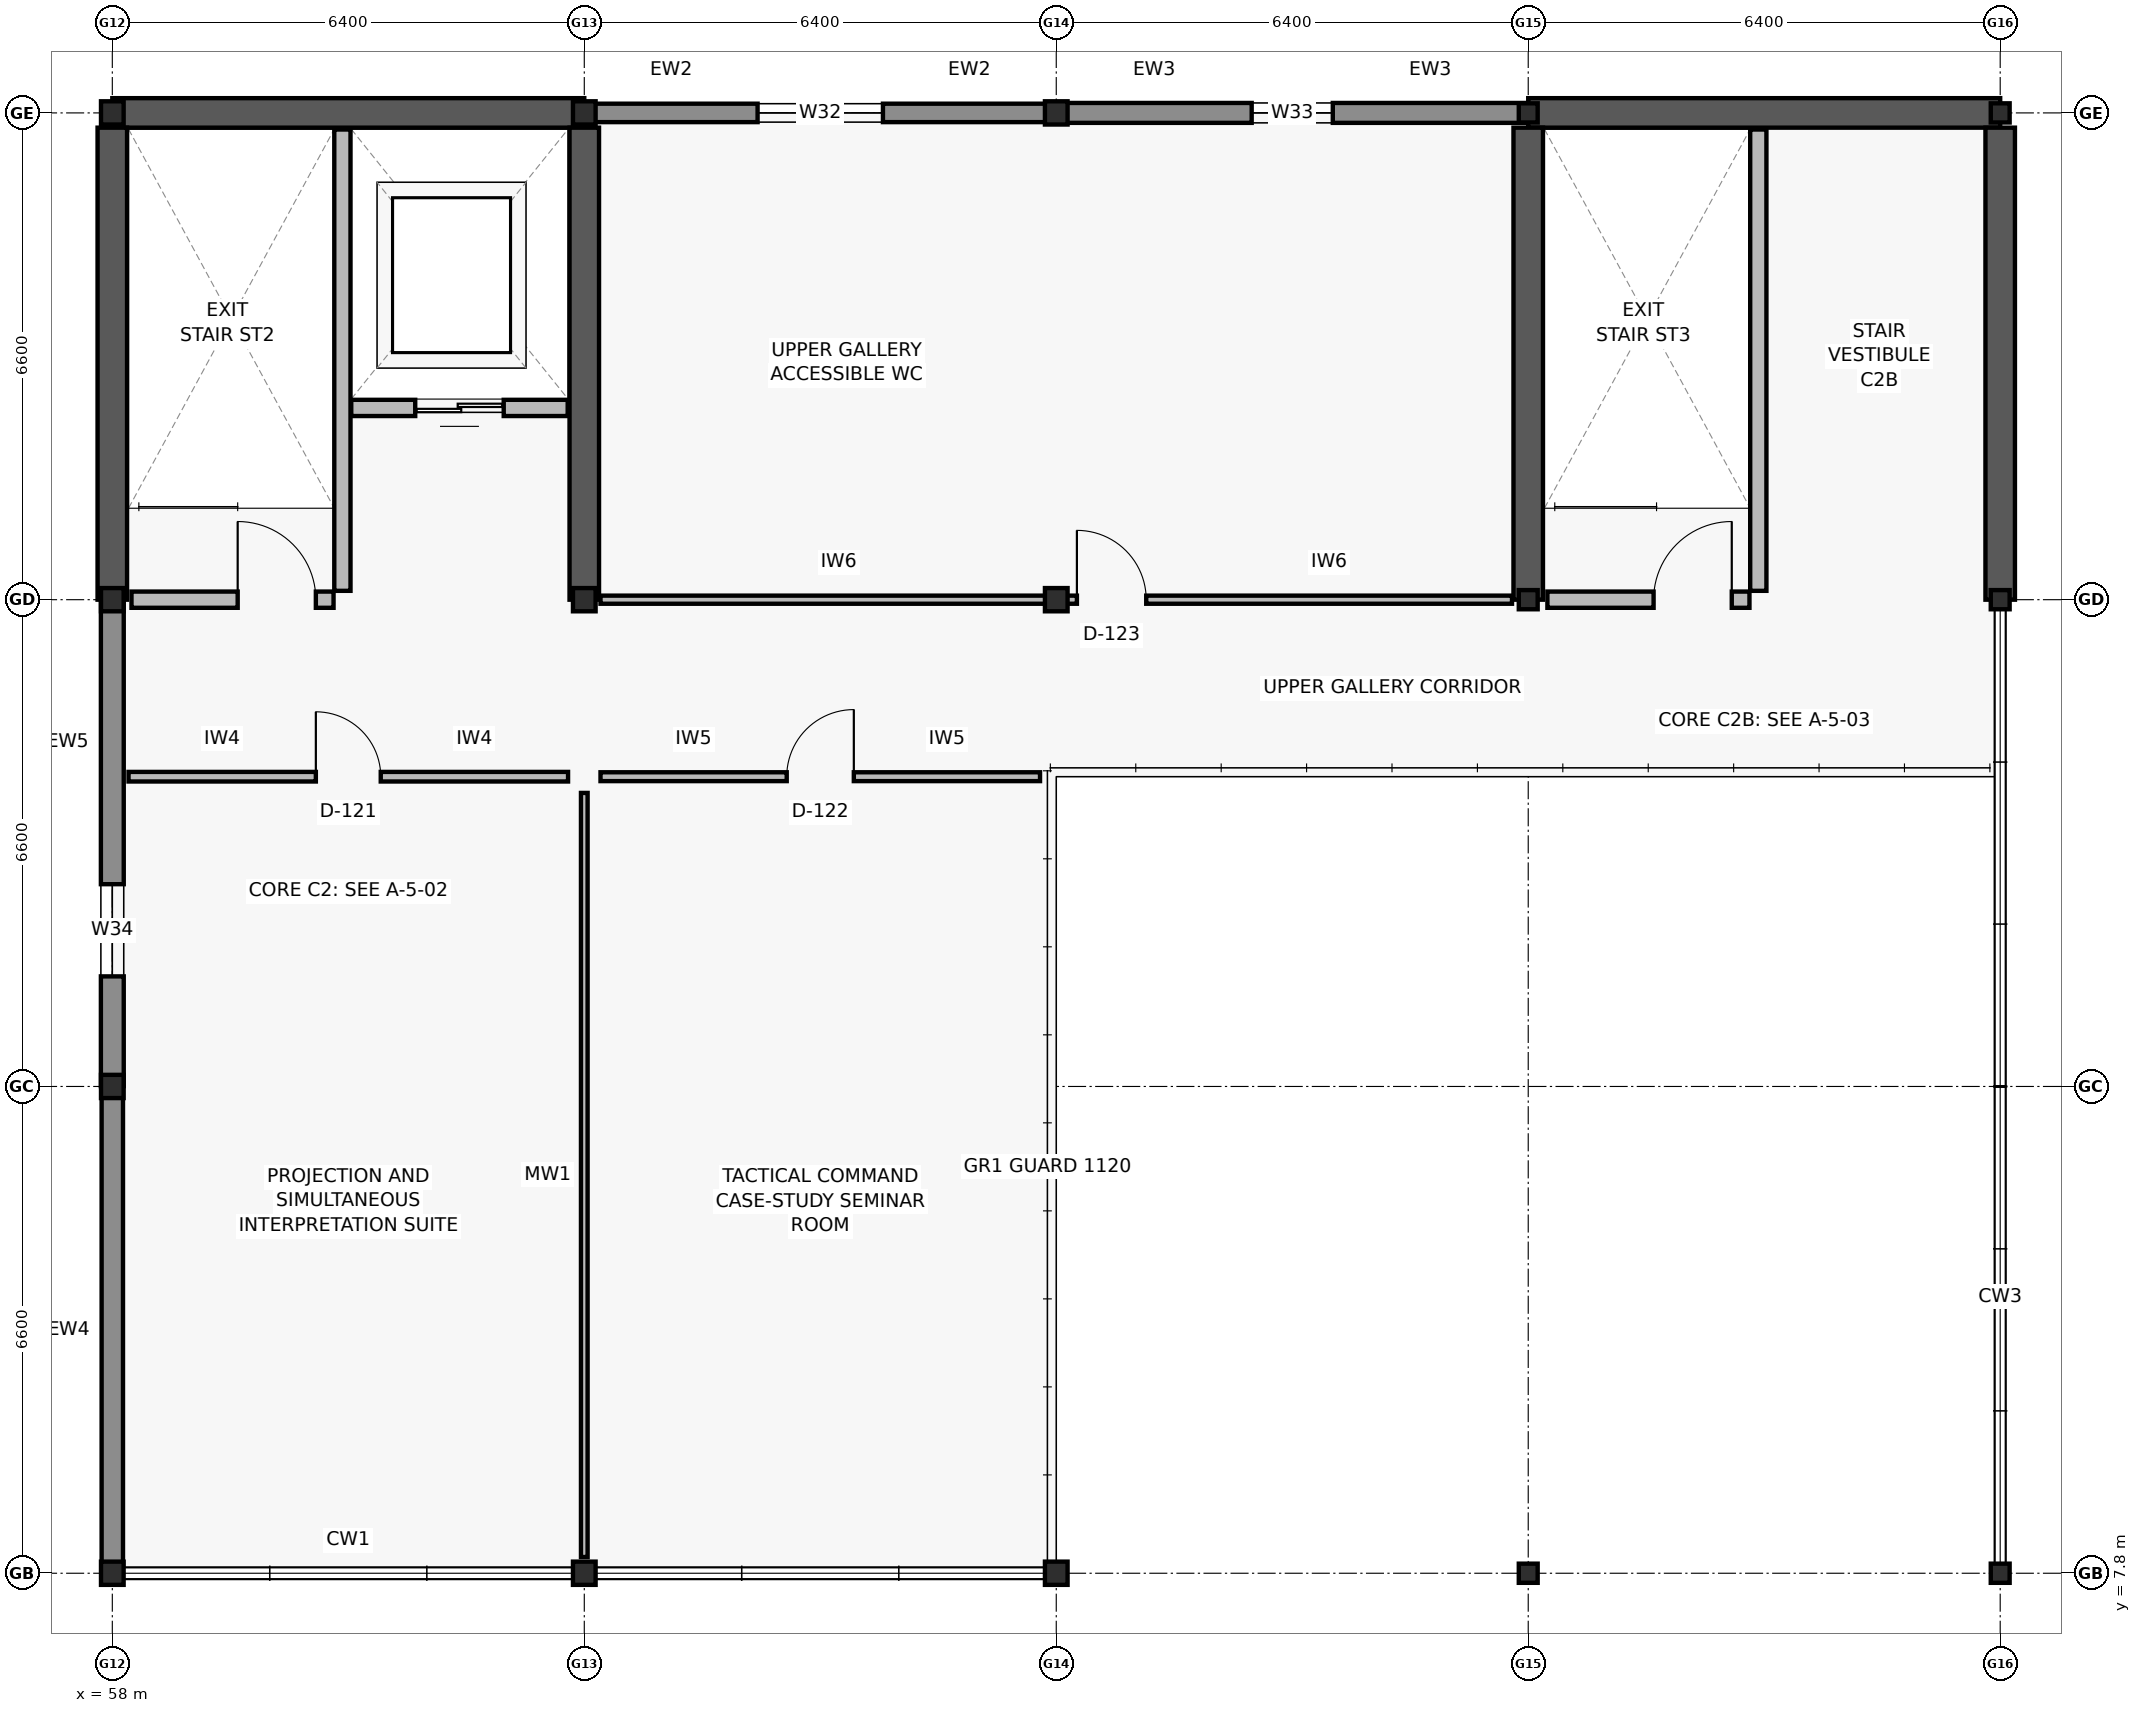
"""IFC4 building model, lengths in metres.
Left out: names, types, materials, properties, quantities, classifications, styles, units other than length and angle.
Written with IfcOpenShell. Run it as: python <this file> out.ifc"""

import sys

from ifc_helpers import new_model, si_unit, direction, frame, frame_2d, origin, origin_2d, place, context, subcontext, project, spatial, rectangle, i_section, extrude, element, fill, save


model = new_model("IFC4")
c1 = context("Model", 3, precision=1e-05, world=origin(), true_north=direction((0.0, 1.0)))
c2 = subcontext(c1, "Body", "Model", "MODEL_VIEW")
j1 = project(units=[si_unit("LENGTHUNIT", "METRE"), si_unit("PLANEANGLEUNIT", "RADIAN")], contexts=[c1])
p1 = place(None, origin())
s1 = spatial("IfcSite", under=j1, at=p1, CompositionType="ELEMENT")
p2 = place(p1, origin())
s2 = spatial("IfcBuilding", under=s1, at=p2, CompositionType="ELEMENT")
p3 = place(p2, frame((0.0, 0.0, 13.5)))
s3 = spatial("IfcBuildingStorey", under=s2, at=p3, CompositionType="ELEMENT", Elevation=13.5)
for number, where, z_axis, x_axis in (
    (1, (58.0, 7.8, 0.0), (0.0, 0.0, 1.0), (1.0, 0.0, 0.0)),
    (2, (58.0, 14.4, 0.0), (0.0, 0.0, 1.0), (1.0, 0.0, 0.0)),
    (3, (58.0, 21.0, 0.0), (0.0, 0.0, 1.0), (1.0, 0.0, 0.0)),
    (4, (58.0, 27.6, 0.0), (0.0, 0.0, 1.0), (1.0, 0.0, 0.0)),
    (5, (64.4, 7.8, 0.0), (0.0, 0.0, 1.0), (1.0, 0.0, 0.0)),
    (6, (64.4, 21.0, 0.0), (0.0, 0.0, 1.0), (1.0, 0.0, 0.0)),
    (7, (64.4, 27.6, 0.0), (0.0, 0.0, 1.0), (1.0, 0.0, 0.0)),
    (8, (70.8, 7.8, 0.0), (0.0, 0.0, 1.0), (1.0, 0.0, 0.0)),
    (9, (70.8, 21.0, 0.0), (0.0, 0.0, 1.0), (1.0, 0.0, 0.0)),
    (10, (70.8, 27.6, 0.0), (0.0, 0.0, 1.0), (1.0, 0.0, 0.0)),
):
    element("IfcColumn", number, at=place(p3, frame(where, z_axis=z_axis, x_axis=x_axis)), inside=s3, PredefinedType="COLUMN", context=c2, shape_type="SweptSolid", body=[
        extrude(i_section(OverallWidth=0.307, OverallDepth=0.315, WebThickness=0.012, FlangeThickness=0.019, FilletRadius=0.017, at=origin_2d()), origin(), (0.0, 0.0, 1.0), 3.9),
    ])
for number, where, z_axis, x_axis in (
    (11, (77.2, 7.8, 0.0), (0.0, 0.0, 1.0), (1.0, 0.0, 0.0)),
    (12, (77.2, 21.0, 0.0), (0.0, 0.0, 1.0), (1.0, 0.0, 0.0)),
    (13, (77.2, 27.6, 0.0), (0.0, 0.0, 1.0), (1.0, 0.0, 0.0)),
    (14, (83.6, 7.8, 0.0), (0.0, 0.0, 1.0), (1.0, 0.0, 0.0)),
    (15, (83.6, 21.0, 0.0), (0.0, 0.0, 1.0), (1.0, 0.0, 0.0)),
    (16, (83.6, 27.6, 0.0), (0.0, 0.0, 1.0), (1.0, 0.0, 0.0)),
):
    element("IfcColumn", number, at=place(p3, frame(where, z_axis=z_axis, x_axis=x_axis)), inside=s3, PredefinedType="COLUMN", context=c2, shape_type="SweptSolid", body=[
        extrude(i_section(OverallWidth=0.256, OverallDepth=0.26, WebThickness=0.01, FlangeThickness=0.017, FilletRadius=0.013, at=origin_2d()), origin(), (0.0, 0.0, 1.0), 3.9),
    ])
for number, where, z_axis, x_axis in (
    (17, (58.0, 27.6, 0.0), (0.0, 0.0, 1.0), (1.0, 0.0, 0.0)),
    (18, (58.0, 21.0, 0.0), (0.0, 0.0, 1.0), (0.0, 1.0, 0.0)),
    (19, (64.4, 21.0, 0.0), (0.0, 0.0, 1.0), (0.0, 1.0, 0.0)),
):
    element("IfcWall", number, at=place(p3, frame(where, z_axis=z_axis, x_axis=x_axis)), inside=s3, PredefinedType="SHEAR", context=c2, shape_type="SweptSolid", body=[
        extrude(rectangle(XDim=6.4, YDim=0.4, at=frame_2d((3.2, 0.0))), origin(), (0.0, 0.0, 1.0), 3.66),
    ])
p4 = place(p3, frame((77.2, 27.6, 0.0), z_axis=(0.0, 0.0, 1.0), x_axis=(1.0, 0.0, 0.0)))
e20 = element("IfcWall", 20, at=p4, inside=s3, PredefinedType="SHEAR", context=c2, shape_type="SweptSolid", body=[
    extrude(rectangle(XDim=6.4, YDim=0.4, at=frame_2d((3.2, 0.0))), origin(), (0.0, 0.0, 1.0), 3.66),
])
for number, where, z_axis, x_axis in (
    (21, (77.2, 21.0, 0.0), (0.0, 0.0, 1.0), (0.0, 1.0, 0.0)),
    (22, (83.6, 21.0, 0.0), (0.0, 0.0, 1.0), (0.0, 1.0, 0.0)),
):
    element("IfcWall", number, at=place(p3, frame(where, z_axis=z_axis, x_axis=x_axis)), inside=s3, PredefinedType="SHEAR", context=c2, shape_type="SweptSolid", body=[
        extrude(rectangle(XDim=6.4, YDim=0.4, at=frame_2d((3.2, 0.0))), origin(), (0.0, 0.0, 1.0), 3.66),
    ])
p5 = place(p3, frame((64.405, 27.6, 0.0), z_axis=(0.0, 0.0, 1.0), x_axis=(1.0, 0.0, 0.0)))
e23 = element("IfcWall", 23, at=p5, inside=s3, PredefinedType="SOLIDWALL", context=c2, shape_type="SweptSolid", body=[
    extrude(rectangle(XDim=6.39, YDim=0.25, at=frame_2d((3.195, 0.0))), origin(), (0.0, 0.0, 1.0), 3.02),
])
p6 = place(p5, frame((2.345, 0.0, 0.8)))
e24 = element("IfcOpeningElement", 24, at=p6, cuts=e23, PredefinedType="OPENING", context=c2, shape_type="SweptSolid", body=[
    extrude(rectangle(XDim=1.7, YDim=1.25, at=frame_2d((0.85, 0.625))), frame((0.0, 0.135, 0.0), z_axis=(0.0, -1.0, 0.0), x_axis=(1.0, 0.0, 0.0)), (0.0, 0.0, 1.0), 0.27),
])
p7 = place(p3, frame((70.805, 27.6, 0.0), z_axis=(0.0, 0.0, 1.0), x_axis=(1.0, 0.0, 0.0)))
e25 = element("IfcWall", 25, at=p7, inside=s3, PredefinedType="SOLIDWALL", context=c2, shape_type="SweptSolid", body=[
    extrude(rectangle(XDim=6.39, YDim=0.27, at=frame_2d((3.195, 0.0))), origin(), (0.0, 0.0, 1.0), 3.02),
])
p8 = place(p7, frame((2.645, 0.0, 0.8)))
e26 = element("IfcOpeningElement", 26, at=p8, cuts=e25, PredefinedType="OPENING", context=c2, shape_type="SweptSolid", body=[
    extrude(rectangle(XDim=1.1, YDim=1.5, at=frame_2d((0.55, 0.75))), frame((0.0, 0.145, 0.0), z_axis=(0.0, -1.0, 0.0), x_axis=(1.0, 0.0, 0.0)), (0.0, 0.0, 1.0), 0.29),
])
p9 = place(p3, frame((58.0, 7.805, 0.0), z_axis=(0.0, 0.0, 1.0), x_axis=(0.0, 1.0, 0.0)))
e27 = element("IfcWall", 27, at=p9, inside=s3, PredefinedType="SOLIDWALL", context=c2, shape_type="SweptSolid", body=[
    extrude(rectangle(XDim=6.59, YDim=0.29, at=frame_2d((3.295, 0.0))), origin(), (0.0, 0.0, 1.0), 3.02),
])
p10 = place(p3, frame((58.0, 14.405, 0.0), z_axis=(0.0, 0.0, 1.0), x_axis=(0.0, 1.0, 0.0)))
e28 = element("IfcWall", 28, at=p10, inside=s3, PredefinedType="SOLIDWALL", context=c2, shape_type="SweptSolid", body=[
    extrude(rectangle(XDim=6.59, YDim=0.31, at=frame_2d((3.295, 0.0))), origin(), (0.0, 0.0, 1.0), 3.02),
])
p11 = place(p10, frame((1.488, 0.0, 0.8)))
e29 = element("IfcOpeningElement", 29, at=p11, cuts=e28, PredefinedType="OPENING", context=c2, shape_type="SweptSolid", body=[
    extrude(rectangle(XDim=1.25, YDim=1.5, at=frame_2d((0.625, 0.75))), frame((0.0, 0.165, 0.0), z_axis=(0.0, -1.0, 0.0), x_axis=(1.0, 0.0, 0.0)), (0.0, 0.0, 1.0), 0.33),
])
p12 = place(p3, frame((61.12, 21.12, 0.0), z_axis=(0.0, 0.0, 1.0), x_axis=(0.0, 1.0, 0.0)))
e30 = element("IfcWall", 30, at=p12, inside=s3, PredefinedType="SOLIDWALL", context=c2, shape_type="SweptSolid", body=[
    extrude(rectangle(XDim=6.255, YDim=0.22, at=frame_2d((3.127, 0.0))), origin(), (0.0, 0.0, 1.0), 3.02),
])
p13 = place(p3, frame((58.26, 21.0, 0.0), z_axis=(0.0, 0.0, 1.0), x_axis=(1.0, 0.0, 0.0)))
e31 = element("IfcWall", 31, at=p13, inside=s3, PredefinedType="SOLIDWALL", context=c2, shape_type="SweptSolid", body=[
    extrude(rectangle(XDim=2.74, YDim=0.22, at=frame_2d((1.37, 0.0))), origin(), (0.0, 0.0, 1.0), 3.02),
])
p14 = place(p13, frame((1.44, 0.0, 0.0)))
e32 = element("IfcOpeningElement", 32, at=p14, cuts=e31, PredefinedType="OPENING", context=c2, shape_type="SweptSolid", body=[
    extrude(rectangle(XDim=1.06, YDim=2.1, at=frame_2d((0.53, 1.05))), frame((0.0, 0.12, 0.0), z_axis=(0.0, -1.0, 0.0), x_axis=(1.0, 0.0, 0.0)), (0.0, 0.0, 1.0), 0.24),
])
p15 = place(p3, frame((61.24, 23.6, 0.0), z_axis=(0.0, 0.0, 1.0), x_axis=(1.0, 0.0, 0.0)))
e33 = element("IfcWall", 33, at=p15, inside=s3, PredefinedType="SOLIDWALL", context=c2, shape_type="SweptSolid", body=[
    extrude(rectangle(XDim=2.935, YDim=0.22, at=frame_2d((1.468, 0.0))), origin(), (0.0, 0.0, 1.0), 3.02),
])
p16 = place(p15, frame((0.867, 0.0, 0.0)))
e34 = element("IfcOpeningElement", 34, at=p16, cuts=e33, PredefinedType="OPENING", context=c2, shape_type="SweptSolid", body=[
    extrude(rectangle(XDim=1.2, YDim=2.15, at=frame_2d((0.6, 1.075))), frame((0.0, 0.12, 0.0), z_axis=(0.0, -1.0, 0.0), x_axis=(1.0, 0.0, 0.0)), (0.0, 0.0, 1.0), 0.24),
])
p17 = place(p3, frame((80.32, 21.12, 0.0), z_axis=(0.0, 0.0, 1.0), x_axis=(0.0, 1.0, 0.0)))
e35 = element("IfcWall", 35, at=p17, inside=s3, PredefinedType="SOLIDWALL", context=c2, shape_type="SweptSolid", body=[
    extrude(rectangle(XDim=6.255, YDim=0.22, at=frame_2d((3.127, 0.0))), origin(), (0.0, 0.0, 1.0), 3.66),
])
p18 = place(p3, frame((77.46, 21.0, 0.0), z_axis=(0.0, 0.0, 1.0), x_axis=(1.0, 0.0, 0.0)))
e36 = element("IfcWall", 36, at=p18, inside=s3, PredefinedType="SOLIDWALL", context=c2, shape_type="SweptSolid", body=[
    extrude(rectangle(XDim=2.74, YDim=0.22, at=frame_2d((1.37, 0.0))), origin(), (0.0, 0.0, 1.0), 3.02),
])
p19 = place(p18, frame((1.44, 0.0, 0.0)))
e37 = element("IfcOpeningElement", 37, at=p19, cuts=e36, PredefinedType="OPENING", context=c2, shape_type="SweptSolid", body=[
    extrude(rectangle(XDim=1.06, YDim=2.1, at=frame_2d((0.53, 1.05))), frame((0.0, 0.12, 0.0), z_axis=(0.0, -1.0, 0.0), x_axis=(1.0, 0.0, 0.0)), (0.0, 0.0, 1.0), 0.24),
])
p20 = place(p3, frame((64.4, 8.02, 0.0), z_axis=(0.0, 0.0, 1.0), x_axis=(0.0, 1.0, 0.0)))
e38 = element("IfcWall", 38, at=p20, inside=s3, PredefinedType="MOVABLE", context=c2, shape_type="SweptSolid", body=[
    extrude(rectangle(XDim=10.36, YDim=0.09, at=frame_2d((5.18, 0.0))), origin(), (0.0, 0.0, 1.0), 3.0),
])
p21 = place(p3, frame((58.22, 18.6, 0.0), z_axis=(0.0, 0.0, 1.0), x_axis=(1.0, 0.0, 0.0)))
e39 = element("IfcWall", 39, at=p21, inside=s3, PredefinedType="PARTITIONING", context=c2, shape_type="SweptSolid", body=[
    extrude(rectangle(XDim=5.96, YDim=0.13, at=frame_2d((2.98, 0.0))), origin(), (0.0, 0.0, 1.0), 3.0),
])
p22 = place(p21, frame((2.54, 0.0, 0.0)))
e40 = element("IfcOpeningElement", 40, at=p22, cuts=e39, PredefinedType="OPENING", context=c2, shape_type="SweptSolid", body=[
    extrude(rectangle(XDim=0.88, YDim=2.04, at=frame_2d((0.44, 1.02))), frame((0.0, 0.075, 0.0), z_axis=(0.0, -1.0, 0.0), x_axis=(1.0, 0.0, 0.0)), (0.0, 0.0, 1.0), 0.15),
])
p23 = place(p3, frame((64.62, 18.6, 0.0), z_axis=(0.0, 0.0, 1.0), x_axis=(1.0, 0.0, 0.0)))
e41 = element("IfcWall", 41, at=p23, inside=s3, PredefinedType="PARTITIONING", context=c2, shape_type="SweptSolid", body=[
    extrude(rectangle(XDim=5.96, YDim=0.12, at=frame_2d((2.98, 0.0))), origin(), (0.0, 0.0, 1.0), 3.0),
])
p24 = place(p23, frame((2.525, 0.0, 0.0)))
e42 = element("IfcOpeningElement", 42, at=p24, cuts=e41, PredefinedType="OPENING", context=c2, shape_type="SweptSolid", body=[
    extrude(rectangle(XDim=0.91, YDim=2.06, at=frame_2d((0.455, 1.03))), frame((0.0, 0.07, 0.0), z_axis=(0.0, -1.0, 0.0), x_axis=(1.0, 0.0, 0.0)), (0.0, 0.0, 1.0), 0.14),
])
p25 = place(p3, frame((64.62, 21.0, 0.0), z_axis=(0.0, 0.0, 1.0), x_axis=(1.0, 0.0, 0.0)))
e43 = element("IfcWall", 43, at=p25, inside=s3, PredefinedType="PARTITIONING", context=c2, shape_type="SweptSolid", body=[
    extrude(rectangle(XDim=12.36, YDim=0.11, at=frame_2d((6.18, 0.0))), origin(), (0.0, 0.0, 1.0), 3.0),
])
p26 = place(p25, frame((6.46, 0.0, 0.0)))
e44 = element("IfcOpeningElement", 44, at=p26, cuts=e43, PredefinedType="OPENING", context=c2, shape_type="SweptSolid", body=[
    extrude(rectangle(XDim=0.94, YDim=2.08, at=frame_2d((0.47, 1.04))), frame((0.0, 0.065, 0.0), z_axis=(0.0, -1.0, 0.0), x_axis=(1.0, 0.0, 0.0)), (0.0, 0.0, 1.0), 0.13),
])
p27 = place(p6, origin())
e45 = element("IfcWindow", 45, at=p27, inside=s3, PartitioningType="DOUBLE_PANEL_VERTICAL", PredefinedType="WINDOW", context=c2, shape_type="SweptSolid", body=[
    extrude(rectangle(XDim=1.7, YDim=1.25, at=frame_2d((0.85, 0.625))), frame((0.0, 0.03, 0.0), z_axis=(0.0, -1.0, 0.0), x_axis=(1.0, 0.0, 0.0)), (0.0, 0.0, 1.0), 0.06),
])
fill(e24, e45)
p28 = place(p8, origin())
e46 = element("IfcWindow", 46, at=p28, inside=s3, PartitioningType="SINGLE_PANEL", PredefinedType="WINDOW", context=c2, shape_type="SweptSolid", body=[
    extrude(rectangle(XDim=1.1, YDim=1.5, at=frame_2d((0.55, 0.75))), frame((0.0, 0.03, 0.0), z_axis=(0.0, -1.0, 0.0), x_axis=(1.0, 0.0, 0.0)), (0.0, 0.0, 1.0), 0.06),
])
fill(e26, e46)
p29 = place(p11, origin())
e47 = element("IfcWindow", 47, at=p29, inside=s3, PartitioningType="SINGLE_PANEL", PredefinedType="WINDOW", context=c2, shape_type="SweptSolid", body=[
    extrude(rectangle(XDim=1.25, YDim=1.5, at=frame_2d((0.625, 0.75))), frame((0.0, 0.03, 0.0), z_axis=(0.0, -1.0, 0.0), x_axis=(1.0, 0.0, 0.0)), (0.0, 0.0, 1.0), 0.06),
])
fill(e29, e47)
p30 = place(p14, origin())
e48 = element("IfcDoor", 48, at=p30, inside=s3, OperationType="SINGLE_SWING_LEFT", PredefinedType="DOOR", context=c2, shape_type="SweptSolid", body=[
    extrude(rectangle(XDim=1.06, YDim=2.1, at=frame_2d((0.53, 1.05))), frame((0.0, 0.025, 0.0), z_axis=(0.0, -1.0, 0.0), x_axis=(1.0, 0.0, 0.0)), (0.0, 0.0, 1.0), 0.05),
])
fill(e32, e48)
p31 = place(p16, origin())
e49 = element("IfcDoor", 49, at=p31, inside=s3, OperationType="DOUBLE_DOOR_SLIDING", PredefinedType="DOOR", context=c2, shape_type="SweptSolid", body=[
    extrude(rectangle(XDim=1.2, YDim=2.15, at=frame_2d((0.6, 1.075))), frame((0.0, 0.025, 0.0), z_axis=(0.0, -1.0, 0.0), x_axis=(1.0, 0.0, 0.0)), (0.0, 0.0, 1.0), 0.05),
])
fill(e34, e49)
p32 = place(p19, origin())
e50 = element("IfcDoor", 50, at=p32, inside=s3, OperationType="SINGLE_SWING_RIGHT", PredefinedType="DOOR", context=c2, shape_type="SweptSolid", body=[
    extrude(rectangle(XDim=1.06, YDim=2.1, at=frame_2d((0.53, 1.05))), frame((0.0, 0.025, 0.0), z_axis=(0.0, -1.0, 0.0), x_axis=(1.0, 0.0, 0.0)), (0.0, 0.0, 1.0), 0.05),
])
fill(e37, e50)
p33 = place(p22, origin())
e51 = element("IfcDoor", 51, at=p33, inside=s3, OperationType="SINGLE_SWING_LEFT", PredefinedType="DOOR", context=c2, shape_type="SweptSolid", body=[
    extrude(rectangle(XDim=0.88, YDim=2.04, at=frame_2d((0.44, 1.02))), frame((0.0, 0.025, 0.0), z_axis=(0.0, -1.0, 0.0), x_axis=(1.0, 0.0, 0.0)), (0.0, 0.0, 1.0), 0.05),
])
fill(e40, e51)
p34 = place(p24, origin())
e52 = element("IfcDoor", 52, at=p34, inside=s3, OperationType="SINGLE_SWING_RIGHT", PredefinedType="DOOR", context=c2, shape_type="SweptSolid", body=[
    extrude(rectangle(XDim=0.91, YDim=2.06, at=frame_2d((0.455, 1.03))), frame((0.0, 0.025, 0.0), z_axis=(0.0, -1.0, 0.0), x_axis=(1.0, 0.0, 0.0)), (0.0, 0.0, 1.0), 0.05),
])
fill(e42, e52)
p35 = place(p26, origin())
e53 = element("IfcDoor", 53, at=p35, inside=s3, OperationType="SINGLE_SWING_LEFT", PredefinedType="DOOR", context=c2, shape_type="SweptSolid", body=[
    extrude(rectangle(XDim=0.94, YDim=2.08, at=frame_2d((0.47, 1.04))), frame((0.0, 0.025, 0.0), z_axis=(0.0, -1.0, 0.0), x_axis=(1.0, 0.0, 0.0)), (0.0, 0.0, 1.0), 0.05),
])
fill(e44, e53)
save(model, sys.argv[1])
